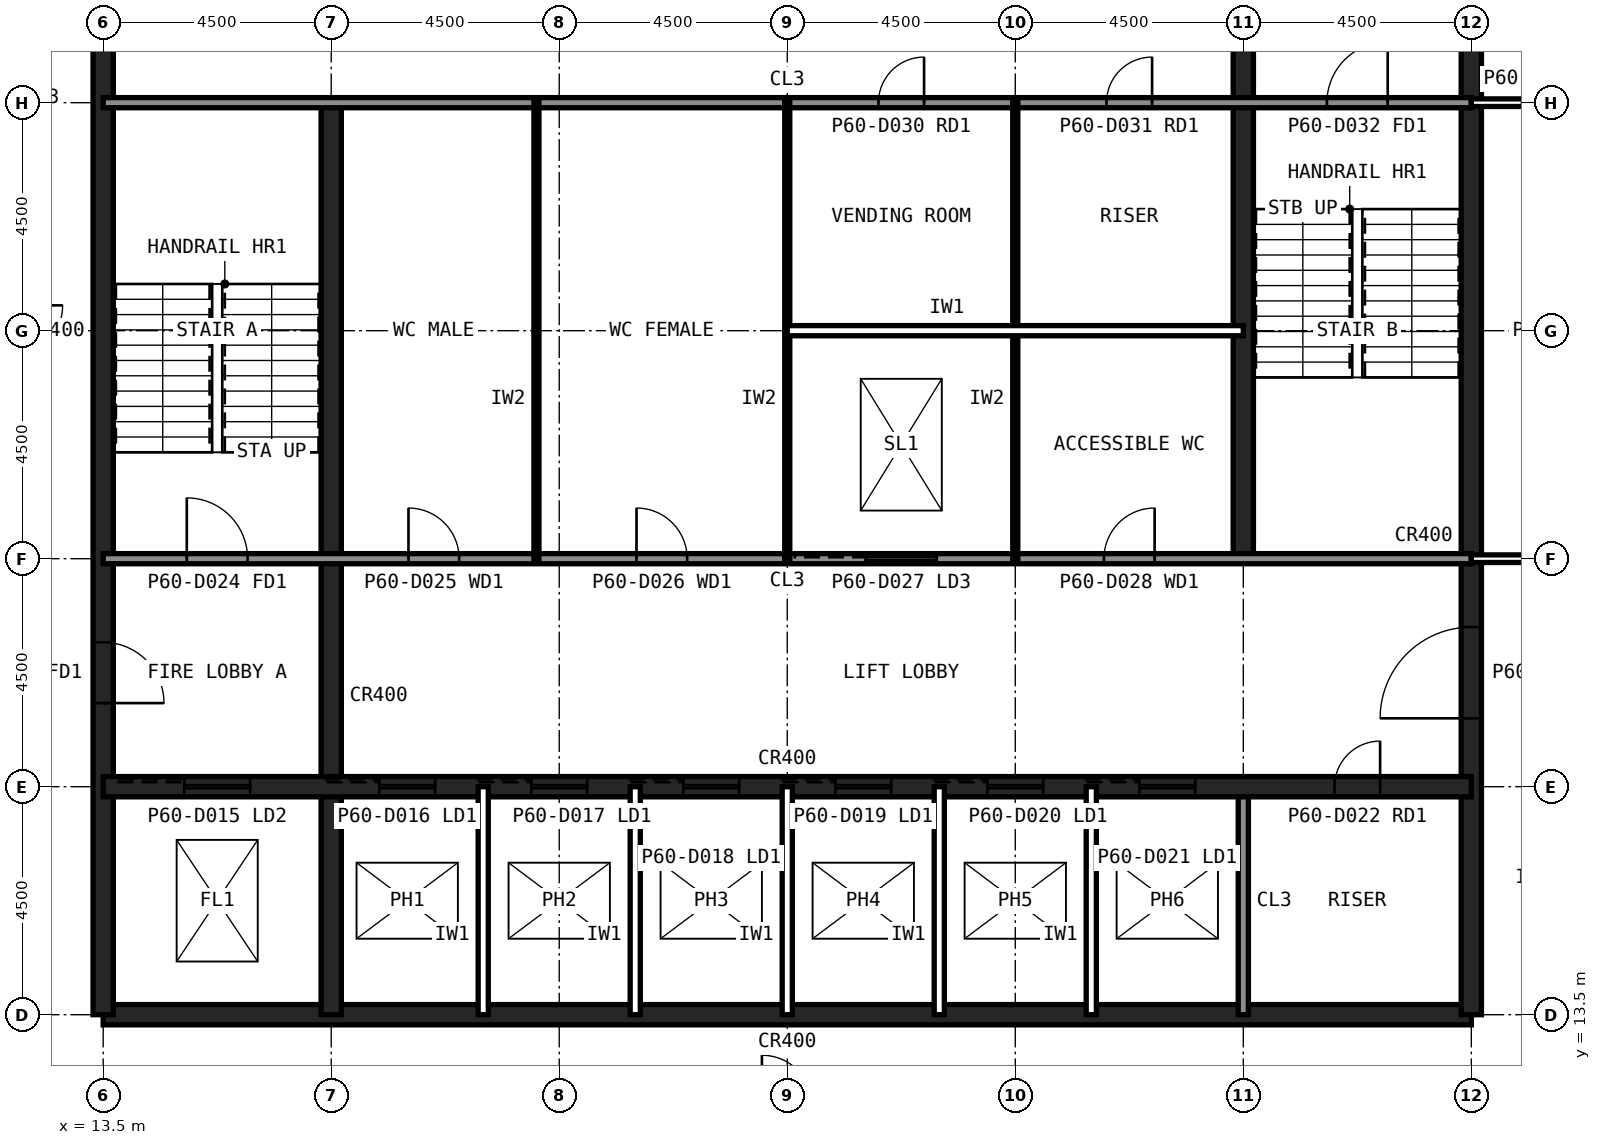
"""IFC4 building model, lengths in metres.
Left out: names, types, materials, properties, quantities, classifications, styles, units other than length and angle.
Written with IfcOpenShell. Run it as: python <this file> out.ifc"""

import sys

from ifc_helpers import new_model, si_unit, direction, frame, frame_2d, origin, place, context, subcontext, project, spatial, rectangle, extrude, element, fill, save


model = new_model("IFC4")
c1 = context("Model", 3, precision=1e-05, world=origin(), true_north=direction((0.0, 1.0)))
c2 = subcontext(c1, "Body", "Model", "MODEL_VIEW")
j1 = project(units=[si_unit("LENGTHUNIT", "METRE"), si_unit("PLANEANGLEUNIT", "RADIAN")], contexts=[c1])
p1 = place(None, origin())
s1 = spatial("IfcSite", under=j1, at=p1, CompositionType="ELEMENT")
p2 = place(p1, origin())
s2 = spatial("IfcBuilding", under=s1, at=p2, CompositionType="ELEMENT")
p3 = place(p2, frame((0.0, 0.0, 254.6)))
s3 = spatial("IfcBuildingStorey", under=s2, at=p3, CompositionType="ELEMENT", Elevation=254.6)
p4 = place(p3, frame((13.5, 13.5, 0.0), z_axis=(0.0, 0.0, 1.0), x_axis=(1.0, 0.0, 0.0)))
e1 = element("IfcWall", 1, at=p4, inside=s3, PredefinedType="SHEAR", context=c2, shape_type="SweptSolid", body=[
    extrude(rectangle(XDim=27.0, YDim=0.4, at=frame_2d((13.5, 0.0))), origin(), (0.0, 0.0, 1.0), 4.0),
])
p5 = place(p3, frame((40.5, 13.5, 0.0), z_axis=(0.0, 0.0, 1.0), x_axis=(0.0, 1.0, 0.0)))
e2 = element("IfcWall", 2, at=p5, inside=s3, PredefinedType="SHEAR", context=c2, shape_type="SweptSolid", body=[
    extrude(rectangle(XDim=27.0, YDim=0.4, at=frame_2d((13.5, 0.0))), origin(), (0.0, 0.0, 1.0), 4.0),
])
p6 = place(p5, frame((5.85, 0.0, 0.0)))
e3 = element("IfcOpeningElement", 3, at=p6, cuts=e2, PredefinedType="OPENING", context=c2, shape_type="SweptSolid", body=[
    extrude(rectangle(XDim=1.8, YDim=2.1, at=frame_2d((0.9, 1.05))), frame((0.0, 0.21, 0.0), z_axis=(0.0, -1.0, 0.0), x_axis=(1.0, 0.0, 0.0)), (0.0, 0.0, 1.0), 0.42),
])
p7 = place(p5, frame((19.65, 0.0, 0.0)))
e4 = element("IfcOpeningElement", 4, at=p7, cuts=e2, PredefinedType="OPENING", context=c2, shape_type="SweptSolid", body=[
    extrude(rectangle(XDim=1.2, YDim=2.1, at=frame_2d((0.6, 1.05))), frame((0.0, 0.21, 0.0), z_axis=(0.0, -1.0, 0.0), x_axis=(1.0, 0.0, 0.0)), (0.0, 0.0, 1.0), 0.42),
])
p8 = place(p3, frame((13.5, 40.5, 0.0), z_axis=(0.0, 0.0, 1.0), x_axis=(0.0, -1.0, 0.0)))
e5 = element("IfcWall", 5, at=p8, inside=s3, PredefinedType="SHEAR", context=c2, shape_type="SweptSolid", body=[
    extrude(rectangle(XDim=27.0, YDim=0.4, at=frame_2d((13.5, 0.0))), origin(), (0.0, 0.0, 1.0), 4.0),
])
p9 = place(p8, frame((19.65, 0.0, 0.0)))
e6 = element("IfcOpeningElement", 6, at=p9, cuts=e5, PredefinedType="OPENING", context=c2, shape_type="SweptSolid", body=[
    extrude(rectangle(XDim=1.2, YDim=2.1, at=frame_2d((0.6, 1.05))), frame((0.0, 0.21, 0.0), z_axis=(0.0, -1.0, 0.0), x_axis=(1.0, 0.0, 0.0)), (0.0, 0.0, 1.0), 0.42),
])
p10 = place(p8, frame((5.85, 0.0, 0.0)))
e7 = element("IfcOpeningElement", 7, at=p10, cuts=e5, PredefinedType="OPENING", context=c2, shape_type="SweptSolid", body=[
    extrude(rectangle(XDim=1.8, YDim=2.1, at=frame_2d((0.9, 1.05))), frame((0.0, 0.21, 0.0), z_axis=(0.0, -1.0, 0.0), x_axis=(1.0, 0.0, 0.0)), (0.0, 0.0, 1.0), 0.42),
])
p11 = place(p3, frame((18.0, 13.5, 0.0), z_axis=(0.0, 0.0, 1.0), x_axis=(0.0, 1.0, 0.0)))
e8 = element("IfcWall", 8, at=p11, inside=s3, PredefinedType="SHEAR", context=c2, shape_type="SweptSolid", body=[
    extrude(rectangle(XDim=18.0, YDim=0.4, at=frame_2d((9.0, 0.0))), origin(), (0.0, 0.0, 1.0), 4.0),
])
p12 = place(p3, frame((36.0, 13.5, 0.0), z_axis=(0.0, 0.0, 1.0), x_axis=(0.0, 1.0, 0.0)))
e9 = element("IfcWall", 9, at=p12, inside=s3, PredefinedType="SOLIDWALL", context=c2, shape_type="SweptSolid", body=[
    extrude(rectangle(XDim=4.5, YDim=0.2, at=frame_2d((2.25, 0.0))), origin(), (0.0, 0.0, 1.0), 3.84),
])
p13 = place(p3, frame((36.0, 22.5, 0.0), z_axis=(0.0, 0.0, 1.0), x_axis=(0.0, 1.0, 0.0)))
e10 = element("IfcWall", 10, at=p13, inside=s3, PredefinedType="SHEAR", context=c2, shape_type="SweptSolid", body=[
    extrude(rectangle(XDim=18.0, YDim=0.4, at=frame_2d((9.0, 0.0))), origin(), (0.0, 0.0, 1.0), 4.0),
])
p14 = place(p3, frame((13.5, 18.0, 0.0), z_axis=(0.0, 0.0, 1.0), x_axis=(1.0, 0.0, 0.0)))
e11 = element("IfcWall", 11, at=p14, inside=s3, PredefinedType="SHEAR", context=c2, shape_type="SweptSolid", body=[
    extrude(rectangle(XDim=27.0, YDim=0.4, at=frame_2d((13.5, 0.0))), origin(), (0.0, 0.0, 1.0), 4.0),
])
p15 = place(p14, frame((24.3, 0.0, 0.0)))
e12 = element("IfcOpeningElement", 12, at=p15, cuts=e11, PredefinedType="OPENING", context=c2, shape_type="SweptSolid", body=[
    extrude(rectangle(XDim=0.9, YDim=2.1, at=frame_2d((0.45, 1.05))), frame((0.0, 0.21, 0.0), z_axis=(0.0, -1.0, 0.0), x_axis=(1.0, 0.0, 0.0)), (0.0, 0.0, 1.0), 0.42),
])
p16 = place(p14, frame((5.45, 0.0, 0.0)))
e13 = element("IfcOpeningElement", 13, at=p16, cuts=e11, PredefinedType="OPENING", context=c2, shape_type="SweptSolid", body=[
    extrude(rectangle(XDim=1.1, YDim=2.1, at=frame_2d((0.55, 1.05))), frame((0.0, 0.21, 0.0), z_axis=(0.0, -1.0, 0.0), x_axis=(1.0, 0.0, 0.0)), (0.0, 0.0, 1.0), 0.42),
])
p17 = place(p14, frame((8.45, 0.0, 0.0)))
e14 = element("IfcOpeningElement", 14, at=p17, cuts=e11, PredefinedType="OPENING", context=c2, shape_type="SweptSolid", body=[
    extrude(rectangle(XDim=1.1, YDim=2.1, at=frame_2d((0.55, 1.05))), frame((0.0, 0.21, 0.0), z_axis=(0.0, -1.0, 0.0), x_axis=(1.0, 0.0, 0.0)), (0.0, 0.0, 1.0), 0.42),
])
p18 = place(p14, frame((11.45, 0.0, 0.0)))
e15 = element("IfcOpeningElement", 15, at=p18, cuts=e11, PredefinedType="OPENING", context=c2, shape_type="SweptSolid", body=[
    extrude(rectangle(XDim=1.1, YDim=2.1, at=frame_2d((0.55, 1.05))), frame((0.0, 0.21, 0.0), z_axis=(0.0, -1.0, 0.0), x_axis=(1.0, 0.0, 0.0)), (0.0, 0.0, 1.0), 0.42),
])
p19 = place(p14, frame((14.45, 0.0, 0.0)))
e16 = element("IfcOpeningElement", 16, at=p19, cuts=e11, PredefinedType="OPENING", context=c2, shape_type="SweptSolid", body=[
    extrude(rectangle(XDim=1.1, YDim=2.1, at=frame_2d((0.55, 1.05))), frame((0.0, 0.21, 0.0), z_axis=(0.0, -1.0, 0.0), x_axis=(1.0, 0.0, 0.0)), (0.0, 0.0, 1.0), 0.42),
])
p20 = place(p14, frame((17.45, 0.0, 0.0)))
e17 = element("IfcOpeningElement", 17, at=p20, cuts=e11, PredefinedType="OPENING", context=c2, shape_type="SweptSolid", body=[
    extrude(rectangle(XDim=1.1, YDim=2.1, at=frame_2d((0.55, 1.05))), frame((0.0, 0.21, 0.0), z_axis=(0.0, -1.0, 0.0), x_axis=(1.0, 0.0, 0.0)), (0.0, 0.0, 1.0), 0.42),
])
p21 = place(p14, frame((20.45, 0.0, 0.0)))
e18 = element("IfcOpeningElement", 18, at=p21, cuts=e11, PredefinedType="OPENING", context=c2, shape_type="SweptSolid", body=[
    extrude(rectangle(XDim=1.1, YDim=2.1, at=frame_2d((0.55, 1.05))), frame((0.0, 0.21, 0.0), z_axis=(0.0, -1.0, 0.0), x_axis=(1.0, 0.0, 0.0)), (0.0, 0.0, 1.0), 0.42),
])
p22 = place(p14, frame((1.6, 0.0, 0.0)))
e19 = element("IfcOpeningElement", 19, at=p22, cuts=e11, PredefinedType="OPENING", context=c2, shape_type="SweptSolid", body=[
    extrude(rectangle(XDim=1.3, YDim=2.2, at=frame_2d((0.65, 1.1))), frame((0.0, 0.21, 0.0), z_axis=(0.0, -1.0, 0.0), x_axis=(1.0, 0.0, 0.0)), (0.0, 0.0, 1.0), 0.42),
])
p23 = place(p3, frame((13.5, 22.5, 0.0), z_axis=(0.0, 0.0, 1.0), x_axis=(1.0, 0.0, 0.0)))
e20 = element("IfcWall", 20, at=p23, inside=s3, PredefinedType="SOLIDWALL", context=c2, shape_type="SweptSolid", body=[
    extrude(rectangle(XDim=27.0, YDim=0.2, at=frame_2d((13.5, 0.0))), origin(), (0.0, 0.0, 1.0), 3.84),
])
p24 = place(p23, frame((1.65, 0.0, 0.0)))
e21 = element("IfcOpeningElement", 21, at=p24, cuts=e20, PredefinedType="OPENING", context=c2, shape_type="SweptSolid", body=[
    extrude(rectangle(XDim=1.2, YDim=2.1, at=frame_2d((0.6, 1.05))), frame((0.0, 0.11, 0.0), z_axis=(0.0, -1.0, 0.0), x_axis=(1.0, 0.0, 0.0)), (0.0, 0.0, 1.0), 0.22),
])
p25 = place(p23, frame((6.025, 0.0, 0.0)))
e22 = element("IfcOpeningElement", 22, at=p25, cuts=e20, PredefinedType="OPENING", context=c2, shape_type="SweptSolid", body=[
    extrude(rectangle(XDim=1.0, YDim=2.1, at=frame_2d((0.5, 1.05))), frame((0.0, 0.11, 0.0), z_axis=(0.0, -1.0, 0.0), x_axis=(1.0, 0.0, 0.0)), (0.0, 0.0, 1.0), 0.22),
])
p26 = place(p23, frame((10.525, 0.0, 0.0)))
e23 = element("IfcOpeningElement", 23, at=p26, cuts=e20, PredefinedType="OPENING", context=c2, shape_type="SweptSolid", body=[
    extrude(rectangle(XDim=1.0, YDim=2.1, at=frame_2d((0.5, 1.05))), frame((0.0, 0.11, 0.0), z_axis=(0.0, -1.0, 0.0), x_axis=(1.0, 0.0, 0.0)), (0.0, 0.0, 1.0), 0.22),
])
p27 = place(p23, frame((19.75, 0.0, 0.0)))
e24 = element("IfcOpeningElement", 24, at=p27, cuts=e20, PredefinedType="OPENING", context=c2, shape_type="SweptSolid", body=[
    extrude(rectangle(XDim=1.0, YDim=2.1, at=frame_2d((0.5, 1.05))), frame((0.0, 0.11, 0.0), z_axis=(0.0, -1.0, 0.0), x_axis=(1.0, 0.0, 0.0)), (0.0, 0.0, 1.0), 0.22),
])
p28 = place(p23, frame((15.05, 0.0, 0.0)))
e25 = element("IfcOpeningElement", 25, at=p28, cuts=e20, PredefinedType="OPENING", context=c2, shape_type="SweptSolid", body=[
    extrude(rectangle(XDim=1.4, YDim=2.4, at=frame_2d((0.7, 1.2))), frame((0.0, 0.11, 0.0), z_axis=(0.0, -1.0, 0.0), x_axis=(1.0, 0.0, 0.0)), (0.0, 0.0, 1.0), 0.22),
])
p29 = place(p3, frame((13.5, 31.5, 0.0), z_axis=(0.0, 0.0, 1.0), x_axis=(1.0, 0.0, 0.0)))
e26 = element("IfcWall", 26, at=p29, inside=s3, PredefinedType="SOLIDWALL", context=c2, shape_type="SweptSolid", body=[
    extrude(rectangle(XDim=27.0, YDim=0.2, at=frame_2d((13.5, 0.0))), origin(), (0.0, 0.0, 1.0), 3.84),
])
p30 = place(p29, frame((24.15, 0.0, 0.0)))
e27 = element("IfcOpeningElement", 27, at=p30, cuts=e26, PredefinedType="OPENING", context=c2, shape_type="SweptSolid", body=[
    extrude(rectangle(XDim=1.2, YDim=2.1, at=frame_2d((0.6, 1.05))), frame((0.0, 0.11, 0.0), z_axis=(0.0, -1.0, 0.0), x_axis=(1.0, 0.0, 0.0)), (0.0, 0.0, 1.0), 0.22),
])
p31 = place(p29, frame((15.3, 0.0, 0.0)))
e28 = element("IfcOpeningElement", 28, at=p31, cuts=e26, PredefinedType="OPENING", context=c2, shape_type="SweptSolid", body=[
    extrude(rectangle(XDim=0.9, YDim=2.1, at=frame_2d((0.45, 1.05))), frame((0.0, 0.11, 0.0), z_axis=(0.0, -1.0, 0.0), x_axis=(1.0, 0.0, 0.0)), (0.0, 0.0, 1.0), 0.22),
])
p32 = place(p29, frame((19.8, 0.0, 0.0)))
e29 = element("IfcOpeningElement", 29, at=p32, cuts=e26, PredefinedType="OPENING", context=c2, shape_type="SweptSolid", body=[
    extrude(rectangle(XDim=0.9, YDim=2.1, at=frame_2d((0.45, 1.05))), frame((0.0, 0.11, 0.0), z_axis=(0.0, -1.0, 0.0), x_axis=(1.0, 0.0, 0.0)), (0.0, 0.0, 1.0), 0.22),
])
for number, where, z_axis, x_axis in (
    (30, (21.0, 13.5, 0.0), (0.0, 0.0, 1.0), (0.0, 1.0, 0.0)),
    (31, (24.0, 13.5, 0.0), (0.0, 0.0, 1.0), (0.0, 1.0, 0.0)),
    (32, (27.0, 13.5, 0.0), (0.0, 0.0, 1.0), (0.0, 1.0, 0.0)),
    (33, (30.0, 13.5, 0.0), (0.0, 0.0, 1.0), (0.0, 1.0, 0.0)),
    (34, (33.0, 13.5, 0.0), (0.0, 0.0, 1.0), (0.0, 1.0, 0.0)),
):
    element("IfcWall", number, at=place(p3, frame(where, z_axis=z_axis, x_axis=x_axis)), inside=s3, PredefinedType="PARTITIONING", context=c2, shape_type="SweptSolid", body=[
        extrude(rectangle(XDim=4.5, YDim=0.2, at=frame_2d((2.25, 0.0))), origin(), (0.0, 0.0, 1.0), 3.84),
    ])
for number, where, z_axis, x_axis in (
    (35, (22.05, 22.5, 0.0), (0.0, 0.0, 1.0), (0.0, 1.0, 0.0)),
    (36, (27.0, 22.5, 0.0), (0.0, 0.0, 1.0), (0.0, 1.0, 0.0)),
    (37, (31.5, 22.5, 0.0), (0.0, 0.0, 1.0), (0.0, 1.0, 0.0)),
):
    element("IfcWall", number, at=place(p3, frame(where, z_axis=z_axis, x_axis=x_axis)), inside=s3, PredefinedType="PLUMBINGWALL", context=c2, shape_type="SweptSolid", body=[
        extrude(rectangle(XDim=9.0, YDim=0.1, at=frame_2d((4.5, 0.0))), origin(), (0.0, 0.0, 1.0), 3.84),
    ])
p33 = place(p3, frame((27.0, 27.0, 0.0), z_axis=(0.0, 0.0, 1.0), x_axis=(1.0, 0.0, 0.0)))
e38 = element("IfcWall", 38, at=p33, inside=s3, PredefinedType="PARTITIONING", context=c2, shape_type="SweptSolid", body=[
    extrude(rectangle(XDim=9.0, YDim=0.2, at=frame_2d((4.5, 0.0))), origin(), (0.0, 0.0, 1.0), 3.84),
])
p34 = place(p3, frame((40.5, 22.5, 0.0), z_axis=(0.0, 0.0, 1.0), x_axis=(1.0, 0.0, 0.0)))
e39 = element("IfcWall", 39, at=p34, inside=s3, PredefinedType="PARTITIONING", context=c2, shape_type="SweptSolid", body=[
    extrude(rectangle(XDim=3.0, YDim=0.15, at=frame_2d((1.5, 0.0))), origin(), (0.0, 0.0, 1.0), 2.989),
])
p35 = place(p3, frame((43.5, 31.5, 0.0), z_axis=(0.0, 0.0, 1.0), x_axis=(-1.0, 0.0, 0.0)))
e40 = element("IfcWall", 40, at=p35, inside=s3, PredefinedType="PARTITIONING", context=c2, shape_type="SweptSolid", body=[
    extrude(rectangle(XDim=3.0, YDim=0.15, at=frame_2d((1.5, 0.0))), origin(), (0.0, 0.0, 1.0), 2.989),
])
p36 = place(p35, frame((1.0, 0.0, 0.0)))
e41 = element("IfcOpeningElement", 41, at=p36, cuts=e40, PredefinedType="OPENING", context=c2, shape_type="SweptSolid", body=[
    extrude(rectangle(XDim=1.0, YDim=2.1, at=frame_2d((0.5, 1.05))), frame((0.0, 0.085, 0.0), z_axis=(0.0, -1.0, 0.0), x_axis=(1.0, 0.0, 0.0)), (0.0, 0.0, 1.0), 0.17),
])
p37 = place(p9, origin())
e42 = element("IfcDoor", 42, at=p37, inside=s3, OperationType="SINGLE_SWING_RIGHT", PredefinedType="DOOR", context=c2, shape_type="SweptSolid", body=[
    extrude(rectangle(XDim=1.2, YDim=2.1, at=frame_2d((0.6, 1.05))), frame((0.0, 0.025, 0.0), z_axis=(0.0, -1.0, 0.0), x_axis=(1.0, 0.0, 0.0)), (0.0, 0.0, 1.0), 0.05),
])
fill(e6, e42)
p38 = place(p6, origin())
e43 = element("IfcDoor", 43, at=p38, inside=s3, OperationType="SINGLE_SWING_LEFT", PredefinedType="DOOR", context=c2, shape_type="SweptSolid", body=[
    extrude(rectangle(XDim=1.8, YDim=2.1, at=frame_2d((0.9, 1.05))), frame((0.0, 0.025, 0.0), z_axis=(0.0, -1.0, 0.0), x_axis=(1.0, 0.0, 0.0)), (0.0, 0.0, 1.0), 0.05),
])
fill(e3, e43)
p39 = place(p24, origin())
e44 = element("IfcDoor", 44, at=p39, inside=s3, OperationType="SINGLE_SWING_LEFT", PredefinedType="DOOR", context=c2, shape_type="SweptSolid", body=[
    extrude(rectangle(XDim=1.2, YDim=2.1, at=frame_2d((0.6, 1.05))), frame((0.0, 0.025, 0.0), z_axis=(0.0, -1.0, 0.0), x_axis=(1.0, 0.0, 0.0)), (0.0, 0.0, 1.0), 0.05),
])
fill(e21, e44)
p40 = place(p30, origin())
e45 = element("IfcDoor", 45, at=p40, inside=s3, OperationType="SINGLE_SWING_RIGHT", PredefinedType="DOOR", context=c2, shape_type="SweptSolid", body=[
    extrude(rectangle(XDim=1.2, YDim=2.1, at=frame_2d((0.6, 1.05))), frame((0.0, 0.025, 0.0), z_axis=(0.0, -1.0, 0.0), x_axis=(1.0, 0.0, 0.0)), (0.0, 0.0, 1.0), 0.05),
])
fill(e27, e45)
p41 = place(p25, origin())
e46 = element("IfcDoor", 46, at=p41, inside=s3, OperationType="SINGLE_SWING_LEFT", PredefinedType="DOOR", context=c2, shape_type="SweptSolid", body=[
    extrude(rectangle(XDim=1.0, YDim=2.1, at=frame_2d((0.5, 1.05))), frame((0.0, 0.025, 0.0), z_axis=(0.0, -1.0, 0.0), x_axis=(1.0, 0.0, 0.0)), (0.0, 0.0, 1.0), 0.05),
])
fill(e22, e46)
p42 = place(p26, origin())
e47 = element("IfcDoor", 47, at=p42, inside=s3, OperationType="SINGLE_SWING_LEFT", PredefinedType="DOOR", context=c2, shape_type="SweptSolid", body=[
    extrude(rectangle(XDim=1.0, YDim=2.1, at=frame_2d((0.5, 1.05))), frame((0.0, 0.025, 0.0), z_axis=(0.0, -1.0, 0.0), x_axis=(1.0, 0.0, 0.0)), (0.0, 0.0, 1.0), 0.05),
])
fill(e23, e47)
p43 = place(p27, origin())
e48 = element("IfcDoor", 48, at=p43, inside=s3, OperationType="SINGLE_SWING_RIGHT", PredefinedType="DOOR", context=c2, shape_type="SweptSolid", body=[
    extrude(rectangle(XDim=1.0, YDim=2.1, at=frame_2d((0.5, 1.05))), frame((0.0, 0.025, 0.0), z_axis=(0.0, -1.0, 0.0), x_axis=(1.0, 0.0, 0.0)), (0.0, 0.0, 1.0), 0.05),
])
fill(e24, e48)
p44 = place(p31, origin())
e49 = element("IfcDoor", 49, at=p44, inside=s3, OperationType="SINGLE_SWING_RIGHT", PredefinedType="DOOR", context=c2, shape_type="SweptSolid", body=[
    extrude(rectangle(XDim=0.9, YDim=2.1, at=frame_2d((0.45, 1.05))), frame((0.0, 0.025, 0.0), z_axis=(0.0, -1.0, 0.0), x_axis=(1.0, 0.0, 0.0)), (0.0, 0.0, 1.0), 0.05),
])
fill(e28, e49)
p45 = place(p32, origin())
e50 = element("IfcDoor", 50, at=p45, inside=s3, OperationType="SINGLE_SWING_RIGHT", PredefinedType="DOOR", context=c2, shape_type="SweptSolid", body=[
    extrude(rectangle(XDim=0.9, YDim=2.1, at=frame_2d((0.45, 1.05))), frame((0.0, 0.025, 0.0), z_axis=(0.0, -1.0, 0.0), x_axis=(1.0, 0.0, 0.0)), (0.0, 0.0, 1.0), 0.05),
])
fill(e29, e50)
p46 = place(p15, origin())
e51 = element("IfcDoor", 51, at=p46, inside=s3, OperationType="SINGLE_SWING_RIGHT", PredefinedType="DOOR", context=c2, shape_type="SweptSolid", body=[
    extrude(rectangle(XDim=0.9, YDim=2.1, at=frame_2d((0.45, 1.05))), frame((0.0, 0.025, 0.0), z_axis=(0.0, -1.0, 0.0), x_axis=(1.0, 0.0, 0.0)), (0.0, 0.0, 1.0), 0.05),
])
fill(e12, e51)
p47 = place(p16, origin())
e52 = element("IfcDoor", 52, at=p47, inside=s3, OperationType="SLIDING_TO_LEFT", PredefinedType="DOOR", context=c2, shape_type="SweptSolid", body=[
    extrude(rectangle(XDim=1.1, YDim=2.1, at=frame_2d((0.55, 1.05))), frame((0.0, 0.025, 0.0), z_axis=(0.0, -1.0, 0.0), x_axis=(1.0, 0.0, 0.0)), (0.0, 0.0, 1.0), 0.05),
])
fill(e13, e52)
p48 = place(p17, origin())
e53 = element("IfcDoor", 53, at=p48, inside=s3, OperationType="SLIDING_TO_LEFT", PredefinedType="DOOR", context=c2, shape_type="SweptSolid", body=[
    extrude(rectangle(XDim=1.1, YDim=2.1, at=frame_2d((0.55, 1.05))), frame((0.0, 0.025, 0.0), z_axis=(0.0, -1.0, 0.0), x_axis=(1.0, 0.0, 0.0)), (0.0, 0.0, 1.0), 0.05),
])
fill(e14, e53)
p49 = place(p18, origin())
e54 = element("IfcDoor", 54, at=p49, inside=s3, OperationType="SLIDING_TO_LEFT", PredefinedType="DOOR", context=c2, shape_type="SweptSolid", body=[
    extrude(rectangle(XDim=1.1, YDim=2.1, at=frame_2d((0.55, 1.05))), frame((0.0, 0.025, 0.0), z_axis=(0.0, -1.0, 0.0), x_axis=(1.0, 0.0, 0.0)), (0.0, 0.0, 1.0), 0.05),
])
fill(e15, e54)
p50 = place(p19, origin())
e55 = element("IfcDoor", 55, at=p50, inside=s3, OperationType="SLIDING_TO_LEFT", PredefinedType="DOOR", context=c2, shape_type="SweptSolid", body=[
    extrude(rectangle(XDim=1.1, YDim=2.1, at=frame_2d((0.55, 1.05))), frame((0.0, 0.025, 0.0), z_axis=(0.0, -1.0, 0.0), x_axis=(1.0, 0.0, 0.0)), (0.0, 0.0, 1.0), 0.05),
])
fill(e16, e55)
p51 = place(p20, origin())
e56 = element("IfcDoor", 56, at=p51, inside=s3, OperationType="SLIDING_TO_LEFT", PredefinedType="DOOR", context=c2, shape_type="SweptSolid", body=[
    extrude(rectangle(XDim=1.1, YDim=2.1, at=frame_2d((0.55, 1.05))), frame((0.0, 0.025, 0.0), z_axis=(0.0, -1.0, 0.0), x_axis=(1.0, 0.0, 0.0)), (0.0, 0.0, 1.0), 0.05),
])
fill(e17, e56)
p52 = place(p21, origin())
e57 = element("IfcDoor", 57, at=p52, inside=s3, OperationType="SLIDING_TO_LEFT", PredefinedType="DOOR", context=c2, shape_type="SweptSolid", body=[
    extrude(rectangle(XDim=1.1, YDim=2.1, at=frame_2d((0.55, 1.05))), frame((0.0, 0.025, 0.0), z_axis=(0.0, -1.0, 0.0), x_axis=(1.0, 0.0, 0.0)), (0.0, 0.0, 1.0), 0.05),
])
fill(e18, e57)
p53 = place(p22, origin())
e58 = element("IfcDoor", 58, at=p53, inside=s3, OperationType="SLIDING_TO_LEFT", PredefinedType="DOOR", context=c2, shape_type="SweptSolid", body=[
    extrude(rectangle(XDim=1.3, YDim=2.2, at=frame_2d((0.65, 1.1))), frame((0.0, 0.025, 0.0), z_axis=(0.0, -1.0, 0.0), x_axis=(1.0, 0.0, 0.0)), (0.0, 0.0, 1.0), 0.05),
])
fill(e19, e58)
p54 = place(p28, origin())
e59 = element("IfcDoor", 59, at=p54, inside=s3, OperationType="SLIDING_TO_LEFT", PredefinedType="DOOR", context=c2, shape_type="SweptSolid", body=[
    extrude(rectangle(XDim=1.4, YDim=2.4, at=frame_2d((0.7, 1.2))), frame((0.0, 0.025, 0.0), z_axis=(0.0, -1.0, 0.0), x_axis=(1.0, 0.0, 0.0)), (0.0, 0.0, 1.0), 0.05),
])
fill(e25, e59)
save(model, sys.argv[1])
